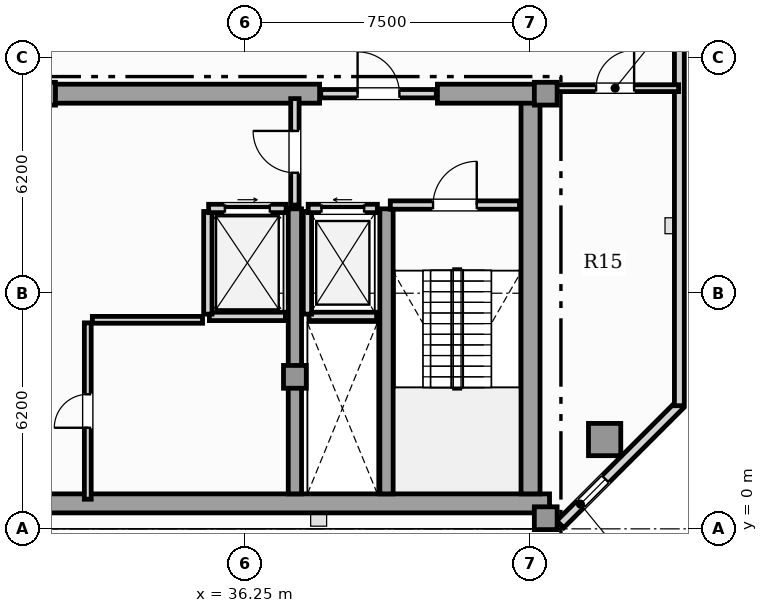
"""IFC4 building model, lengths in metres.
Left out: names, types, materials, properties, quantities, classifications, styles, units other than length and angle.
Written with IfcOpenShell. Run it as: python <this file> out.ifc"""

import sys

from ifc_helpers import new_model, si_unit, direction, frame, frame_2d, origin, origin_2d, place, context, subcontext, project, spatial, rectangle, hollow_rectangle, extrude, element, fill, save


model = new_model("IFC4")
c1 = context("Model", 3, precision=1e-05, world=origin(), true_north=direction((0.0, 1.0)))
c2 = subcontext(c1, "Body", "Model", "MODEL_VIEW")
j1 = project(units=[si_unit("LENGTHUNIT", "METRE"), si_unit("PLANEANGLEUNIT", "RADIAN")], contexts=[c1])
p1 = place(None, origin())
s1 = spatial("IfcSite", under=j1, at=p1, CompositionType="ELEMENT")
p2 = place(p1, origin())
s2 = spatial("IfcBuilding", under=s1, at=p2, CompositionType="ELEMENT")
p3 = place(p2, frame((0.0, 0.0, 357.85)))
s3 = spatial("IfcBuildingStorey", under=s2, at=p3, CompositionType="ELEMENT", Elevation=357.85)
p4 = place(p3, frame((13.25, 0.67, 0.0), z_axis=(0.0, 0.0, 1.0), x_axis=(1.0, 0.0, 0.0)))
e1 = element("IfcWall", 1, at=p4, inside=s3, PredefinedType="SHEAR", context=c2, shape_type="SweptSolid", body=[
    extrude(rectangle(XDim=31.0, YDim=0.5, at=frame_2d((15.5, 0.0))), origin(), (0.0, 0.0, 1.0), 4.14),
])
p5 = place(p3, frame((43.75, 0.92, 0.0), z_axis=(0.0, 0.0, 1.0), x_axis=(0.0, 1.0, 0.0)))
e2 = element("IfcWall", 2, at=p5, inside=s3, PredefinedType="SHEAR", context=c2, shape_type="SweptSolid", body=[
    extrude(rectangle(XDim=10.53, YDim=0.5, at=frame_2d((5.265, 0.0))), origin(), (0.0, 0.0, 1.0), 4.14),
])
p6 = place(p3, frame((30.9, 11.45, 0.0), z_axis=(0.0, 0.0, 1.0), x_axis=(1.0, 0.0, 0.0)))
e3 = element("IfcWall", 3, at=p6, inside=s3, PredefinedType="SHEAR", context=c2, shape_type="SweptSolid", body=[
    extrude(rectangle(XDim=7.3, YDim=0.5, at=frame_2d((3.65, 0.0))), origin(), (0.0, 0.0, 1.0), 4.14),
])
p7 = place(p3, frame((41.3, 11.45, 0.0), z_axis=(0.0, 0.0, 1.0), x_axis=(1.0, 0.0, 0.0)))
e4 = element("IfcWall", 4, at=p7, inside=s3, PredefinedType="SHEAR", context=c2, shape_type="SweptSolid", body=[
    extrude(rectangle(XDim=2.95, YDim=0.5, at=frame_2d((1.475, 0.0))), origin(), (0.0, 0.0, 1.0), 4.14),
])
for number, where, z_axis, x_axis in (
    (5, (37.55, 0.92, 0.0), (0.0, 0.0, 1.0), (0.0, 1.0, 0.0)),
    (6, (39.96, 0.92, 0.0), (0.0, 0.0, 1.0), (0.0, 1.0, 0.0)),
):
    element("IfcWall", number, at=place(p3, frame(where, z_axis=z_axis, x_axis=x_axis)), inside=s3, PredefinedType="SHEAR", context=c2, shape_type="SweptSolid", body=[
        extrude(rectangle(XDim=7.5, YDim=0.35, at=frame_2d((3.75, 0.0))), origin(), (0.0, 0.0, 1.0), 4.14),
    ])
for number, where, z_axis, x_axis in (
    (7, (44.15, 0.28, 0.0), (0.0, 0.0, 1.0), (1.0, 0.0, 0.0)),
    (8, (44.15, 11.45, 0.0), (0.0, 0.0, 1.0), (1.0, 0.0, 0.0)),
    (9, (37.55, 4.0, 0.0), (0.0, 0.0, 1.0), (1.0, 0.0, 0.0)),
    (10, (30.95, 11.45, 0.0), (0.0, 0.0, 1.0), (1.0, 0.0, 0.0)),
):
    element("IfcColumn", number, at=place(p3, frame(where, z_axis=z_axis, x_axis=x_axis)), inside=s3, PredefinedType="COLUMN", context=c2, shape_type="SweptSolid", body=[
        extrude(rectangle(XDim=0.6, YDim=0.6, at=origin_2d()), origin(), (0.0, 0.0, 1.0), 4.4),
    ])
p8 = place(p3, frame((45.7, 2.35, 0.0), z_axis=(0.0, 0.0, 1.0), x_axis=(1.0, 0.0, 0.0)))
e11 = element("IfcColumn", 11, at=p8, inside=s3, PredefinedType="USERDEFINED", context=c2, shape_type="SweptSolid", body=[
    extrude(hollow_rectangle(XDim=0.85, YDim=0.85, WallThickness=0.05, at=origin_2d()), origin(), (0.0, 0.0, 1.0), 4.4),
])
p9 = place(p3, frame((44.532, 0.12, 0.0), z_axis=(0.0, 0.0, 1.0), x_axis=(0.707079321262, 0.707134240044, 0.0)))
e12 = element("IfcWall", 12, at=p9, inside=s3, PredefinedType="SOLIDWALL", context=c2, shape_type="SweptSolid", body=[
    extrude(rectangle(XDim=4.446, YDim=0.26, at=frame_2d((2.223, 0.0))), origin(), (0.0, 0.0, 1.0), 4.14),
])
p10 = place(p9, frame((0.78, 0.0, 0.95)))
e13 = element("IfcOpeningElement", 13, at=p10, cuts=e12, PredefinedType="OPENING", context=c2, shape_type="SweptSolid", body=[
    extrude(rectangle(XDim=0.9, YDim=1.5, at=frame_2d((0.45, 0.75))), frame((0.0, 0.14, 0.0), z_axis=(0.0, -1.0, 0.0), x_axis=(1.0, 0.0, 0.0)), (0.0, 0.0, 1.0), 0.28),
])
p11 = place(p3, frame((47.666, 3.24, 0.0), z_axis=(0.0, 0.0, 1.0), x_axis=(0.0, 1.0, 0.0)))
e14 = element("IfcWall", 14, at=p11, inside=s3, PredefinedType="SOLIDWALL", context=c2, shape_type="SweptSolid", body=[
    extrude(rectangle(XDim=24.346, YDim=0.26, at=frame_2d((12.173, 0.0))), origin(), (0.0, 0.0, 1.0), 4.14),
])
p12 = place(p11, frame((20.615, 0.0, 0.95)))
e15 = element("IfcOpeningElement", 15, at=p12, cuts=e14, PredefinedType="OPENING", context=c2, shape_type="SweptSolid", body=[
    extrude(rectangle(XDim=0.9, YDim=1.5, at=frame_2d((0.45, 0.75))), frame((0.0, 0.14, 0.0), z_axis=(0.0, -1.0, 0.0), x_axis=(1.0, 0.0, 0.0)), (0.0, 0.0, 1.0), 0.28),
])
p13 = place(p11, frame((12.61, 0.0, 0.9)))
e16 = element("IfcOpeningElement", 16, at=p13, cuts=e14, PredefinedType="OPENING", context=c2, shape_type="SweptSolid", body=[
    extrude(rectangle(XDim=1.5, YDim=1.95, at=frame_2d((0.75, 0.975))), frame((0.0, 0.14, 0.0), z_axis=(0.0, -1.0, 0.0), x_axis=(1.0, 0.0, 0.0)), (0.0, 0.0, 1.0), 0.28),
])
p14 = place(p11, frame((22.076, 0.0, 0.9)))
e17 = element("IfcOpeningElement", 17, at=p14, cuts=e14, PredefinedType="OPENING", context=c2, shape_type="SweptSolid", body=[
    extrude(rectangle(XDim=1.5, YDim=1.95, at=frame_2d((0.75, 0.975))), frame((0.0, 0.14, 0.0), z_axis=(0.0, -1.0, 0.0), x_axis=(1.0, 0.0, 0.0)), (0.0, 0.0, 1.0), 0.28),
])
p15 = place(p3, frame((37.92, 5.59, 0.0), z_axis=(0.0, 0.0, 1.0), x_axis=(1.0, 0.0, 0.0)))
e18 = element("IfcWall", 18, at=p15, inside=s3, PredefinedType="SOLIDWALL", context=c2, shape_type="SweptSolid", body=[
    extrude(rectangle(XDim=1.78, YDim=0.22, at=frame_2d((0.89, 0.0))), origin(), (0.0, 0.0, 1.0), 4.14),
])
p16 = place(p3, frame((37.88, 5.65, 0.0), z_axis=(0.0, 0.0, 1.0), x_axis=(0.0, 1.0, 0.0)))
e19 = element("IfcWall", 19, at=p16, inside=s3, PredefinedType="SOLIDWALL", context=c2, shape_type="SweptSolid", body=[
    extrude(rectangle(XDim=2.7, YDim=0.22, at=frame_2d((1.35, 0.0))), origin(), (0.0, 0.0, 1.0), 4.14),
])
p17 = place(p3, frame((37.9, 8.43, 0.0), z_axis=(0.0, 0.0, 1.0), x_axis=(1.0, 0.0, 0.0)))
e20 = element("IfcWall", 20, at=p17, inside=s3, PredefinedType="SOLIDWALL", context=c2, shape_type="SweptSolid", body=[
    extrude(rectangle(XDim=1.82, YDim=0.22, at=frame_2d((0.91, 0.0))), origin(), (0.0, 0.0, 1.0), 4.14),
])
p18 = place(p17, frame((0.35, 0.0, 0.0)))
e21 = element("IfcOpeningElement", 21, at=p18, cuts=e20, PredefinedType="OPENING", context=c2, shape_type="SweptSolid", body=[
    extrude(rectangle(XDim=1.12, YDim=2.25, at=frame_2d((0.56, 1.125))), frame((0.0, 0.12, 0.0), z_axis=(0.0, -1.0, 0.0), x_axis=(1.0, 0.0, 0.0)), (0.0, 0.0, 1.0), 0.24),
])
p19 = place(p3, frame((35.3, 5.59, 0.0), z_axis=(0.0, 0.0, 1.0), x_axis=(1.0, 0.0, 0.0)))
e22 = element("IfcWall", 22, at=p19, inside=s3, PredefinedType="SOLIDWALL", context=c2, shape_type="SweptSolid", body=[
    extrude(rectangle(XDim=2.0, YDim=0.22, at=frame_2d((1.0, 0.0))), origin(), (0.0, 0.0, 1.0), 4.14),
])
p20 = place(p3, frame((35.26, 5.65, 0.0), z_axis=(0.0, 0.0, 1.0), x_axis=(0.0, 1.0, 0.0)))
e23 = element("IfcWall", 23, at=p20, inside=s3, PredefinedType="SOLIDWALL", context=c2, shape_type="SweptSolid", body=[
    extrude(rectangle(XDim=2.7, YDim=0.22, at=frame_2d((1.35, 0.0))), origin(), (0.0, 0.0, 1.0), 4.14),
])
p21 = place(p3, frame((35.28, 8.43, 0.0), z_axis=(0.0, 0.0, 1.0), x_axis=(1.0, 0.0, 0.0)))
e24 = element("IfcWall", 24, at=p21, inside=s3, PredefinedType="SOLIDWALL", context=c2, shape_type="SweptSolid", body=[
    extrude(rectangle(XDim=2.04, YDim=0.22, at=frame_2d((1.02, 0.0))), origin(), (0.0, 0.0, 1.0), 4.14),
])
p22 = place(p21, frame((0.43, 0.0, 0.0)))
e25 = element("IfcOpeningElement", 25, at=p22, cuts=e24, PredefinedType="OPENING", context=c2, shape_type="SweptSolid", body=[
    extrude(rectangle(XDim=1.18, YDim=2.2, at=frame_2d((0.59, 1.1))), frame((0.0, 0.12, 0.0), z_axis=(0.0, -1.0, 0.0), x_axis=(1.0, 0.0, 0.0)), (0.0, 0.0, 1.0), 0.24),
])
p23 = place(p3, frame((40.06, 8.52, 0.0), z_axis=(0.0, 0.0, 1.0), x_axis=(1.0, 0.0, 0.0)))
e26 = element("IfcWall", 26, at=p23, inside=s3, PredefinedType="SOLIDWALL", context=c2, shape_type="SweptSolid", body=[
    extrude(rectangle(XDim=3.4, YDim=0.22, at=frame_2d((1.7, 0.0))), origin(), (0.0, 0.0, 1.0), 4.14),
])
p24 = place(p23, frame((1.125, 0.0, 0.0)))
e27 = element("IfcOpeningElement", 27, at=p24, cuts=e26, PredefinedType="OPENING", context=c2, shape_type="SweptSolid", body=[
    extrude(rectangle(XDim=1.15, YDim=2.2, at=frame_2d((0.575, 1.1))), frame((0.0, 0.12, 0.0), z_axis=(0.0, -1.0, 0.0), x_axis=(1.0, 0.0, 0.0)), (0.0, 0.0, 1.0), 0.24),
])
p25 = place(p3, frame((37.55, 8.52, 0.0), z_axis=(0.0, 0.0, 1.0), x_axis=(0.0, 1.0, 0.0)))
e28 = element("IfcWall", 28, at=p25, inside=s3, PredefinedType="SOLIDWALL", context=c2, shape_type="SweptSolid", body=[
    extrude(rectangle(XDim=2.8, YDim=0.22, at=frame_2d((1.4, 0.0))), origin(), (0.0, 0.0, 1.0), 3.595),
])
p26 = place(p25, frame((0.85, 0.0, 0.0)))
e29 = element("IfcOpeningElement", 29, at=p26, cuts=e28, PredefinedType="OPENING", context=c2, shape_type="SweptSolid", body=[
    extrude(rectangle(XDim=1.1, YDim=2.2, at=frame_2d((0.55, 1.1))), frame((0.0, 0.12, 0.0), z_axis=(0.0, -1.0, 0.0), x_axis=(1.0, 0.0, 0.0)), (0.0, 0.0, 1.0), 0.24),
])
p27 = place(p3, frame((38.23, 11.45, 0.0), z_axis=(0.0, 0.0, 1.0), x_axis=(1.0, 0.0, 0.0)))
e30 = element("IfcWall", 30, at=p27, inside=s3, PredefinedType="SOLIDWALL", context=c2, shape_type="SweptSolid", body=[
    extrude(rectangle(XDim=3.04, YDim=0.22, at=frame_2d((1.52, 0.0))), origin(), (0.0, 0.0, 1.0), 4.14),
])
p28 = place(p27, frame((0.97, 0.0, 0.0)))
e31 = element("IfcOpeningElement", 31, at=p28, cuts=e30, PredefinedType="OPENING", context=c2, shape_type="SweptSolid", body=[
    extrude(rectangle(XDim=1.1, YDim=2.2, at=frame_2d((0.55, 1.1))), frame((0.0, 0.12, 0.0), z_axis=(0.0, -1.0, 0.0), x_axis=(1.0, 0.0, 0.0)), (0.0, 0.0, 1.0), 0.24),
])
p29 = place(p3, frame((32.1, 0.78, 0.0), z_axis=(0.0, 0.0, 1.0), x_axis=(0.0, 1.0, 0.0)))
e32 = element("IfcWall", 32, at=p29, inside=s3, PredefinedType="PARTITIONING", context=c2, shape_type="SweptSolid", body=[
    extrude(rectangle(XDim=4.64, YDim=0.18, at=frame_2d((2.32, 0.0))), origin(), (0.0, 0.0, 1.0), 4.14),
])
p30 = place(p29, frame((1.88, 0.0, 0.0)))
e33 = element("IfcOpeningElement", 33, at=p30, cuts=e32, PredefinedType="OPENING", context=c2, shape_type="SweptSolid", body=[
    extrude(rectangle(XDim=0.88, YDim=2.05, at=frame_2d((0.44, 1.025))), frame((0.0, 0.1, 0.0), z_axis=(0.0, -1.0, 0.0), x_axis=(1.0, 0.0, 0.0)), (0.0, 0.0, 1.0), 0.2),
])
p31 = place(p3, frame((32.22, 5.5, 0.0), z_axis=(0.0, 0.0, 1.0), x_axis=(1.0, 0.0, 0.0)))
e34 = element("IfcWall", 34, at=p31, inside=s3, PredefinedType="PARTITIONING", context=c2, shape_type="SweptSolid", body=[
    extrude(rectangle(XDim=2.9, YDim=0.18, at=frame_2d((1.45, 0.0))), origin(), (0.0, 0.0, 1.0), 4.14),
])
p32 = place(p3, frame((44.305, 11.595, 0.0), z_axis=(0.0, 0.0, 1.0), x_axis=(1.0, 0.0, 0.0)))
e35 = element("IfcWall", 35, at=p32, inside=s3, PredefinedType="PARTITIONING", context=c2, shape_type="SweptSolid", body=[
    extrude(rectangle(XDim=3.342, YDim=0.18, at=frame_2d((1.671, 0.0))), origin(), (0.0, 0.0, 1.0), 4.14),
])
p33 = place(p32, frame((1.171, 0.0, 0.0)))
e36 = element("IfcOpeningElement", 36, at=p33, cuts=e35, PredefinedType="OPENING", context=c2, shape_type="SweptSolid", body=[
    extrude(rectangle(XDim=1.0, YDim=2.15, at=frame_2d((0.5, 1.075))), frame((0.0, 0.1, 0.0), z_axis=(0.0, -1.0, 0.0), x_axis=(1.0, 0.0, 0.0)), (0.0, 0.0, 1.0), 0.2),
])
p34 = place(p10, origin())
e37 = element("IfcWindow", 37, at=p34, inside=s3, PartitioningType="SINGLE_PANEL", PredefinedType="WINDOW", context=c2, shape_type="SweptSolid", body=[
    extrude(rectangle(XDim=0.9, YDim=1.5, at=frame_2d((0.45, 0.75))), frame((0.0, 0.03, 0.0), z_axis=(0.0, -1.0, 0.0), x_axis=(1.0, 0.0, 0.0)), (0.0, 0.0, 1.0), 0.06),
])
fill(e13, e37)
p35 = place(p18, origin())
e38 = element("IfcDoor", 38, at=p35, inside=s3, OperationType="SLIDING_TO_LEFT", PredefinedType="DOOR", context=c2, shape_type="SweptSolid", body=[
    extrude(rectangle(XDim=1.12, YDim=2.25, at=frame_2d((0.56, 1.125))), frame((0.0, 0.025, 0.0), z_axis=(0.0, -1.0, 0.0), x_axis=(1.0, 0.0, 0.0)), (0.0, 0.0, 1.0), 0.05),
])
fill(e21, e38)
p36 = place(p22, origin())
e39 = element("IfcDoor", 39, at=p36, inside=s3, OperationType="SLIDING_TO_RIGHT", PredefinedType="DOOR", context=c2, shape_type="SweptSolid", body=[
    extrude(rectangle(XDim=1.18, YDim=2.2, at=frame_2d((0.59, 1.1))), frame((0.0, 0.025, 0.0), z_axis=(0.0, -1.0, 0.0), x_axis=(1.0, 0.0, 0.0)), (0.0, 0.0, 1.0), 0.05),
])
fill(e25, e39)
p37 = place(p24, origin())
e40 = element("IfcDoor", 40, at=p37, inside=s3, OperationType="SINGLE_SWING_RIGHT", PredefinedType="DOOR", context=c2, shape_type="SweptSolid", body=[
    extrude(rectangle(XDim=1.15, YDim=2.2, at=frame_2d((0.575, 1.1))), frame((0.0, 0.025, 0.0), z_axis=(0.0, -1.0, 0.0), x_axis=(1.0, 0.0, 0.0)), (0.0, 0.0, 1.0), 0.05),
])
fill(e27, e40)
p38 = place(p26, origin())
e41 = element("IfcDoor", 41, at=p38, inside=s3, OperationType="SINGLE_SWING_RIGHT", PredefinedType="DOOR", context=c2, shape_type="SweptSolid", body=[
    extrude(rectangle(XDim=1.1, YDim=2.2, at=frame_2d((0.55, 1.1))), frame((0.0, 0.025, 0.0), z_axis=(0.0, -1.0, 0.0), x_axis=(1.0, 0.0, 0.0)), (0.0, 0.0, 1.0), 0.05),
])
fill(e29, e41)
p39 = place(p28, origin())
e42 = element("IfcDoor", 42, at=p39, inside=s3, OperationType="SINGLE_SWING_LEFT", PredefinedType="DOOR", context=c2, shape_type="SweptSolid", body=[
    extrude(rectangle(XDim=1.1, YDim=2.2, at=frame_2d((0.55, 1.1))), frame((0.0, 0.025, 0.0), z_axis=(0.0, -1.0, 0.0), x_axis=(1.0, 0.0, 0.0)), (0.0, 0.0, 1.0), 0.05),
])
fill(e31, e42)
p40 = place(p30, origin())
e43 = element("IfcDoor", 43, at=p40, inside=s3, OperationType="SINGLE_SWING_LEFT", PredefinedType="DOOR", context=c2, shape_type="SweptSolid", body=[
    extrude(rectangle(XDim=0.88, YDim=2.05, at=frame_2d((0.44, 1.025))), frame((0.0, 0.025, 0.0), z_axis=(0.0, -1.0, 0.0), x_axis=(1.0, 0.0, 0.0)), (0.0, 0.0, 1.0), 0.05),
])
fill(e33, e43)
p41 = place(p33, origin())
e44 = element("IfcDoor", 44, at=p41, inside=s3, OperationType="SINGLE_SWING_RIGHT", PredefinedType="DOOR", context=c2, shape_type="SweptSolid", body=[
    extrude(rectangle(XDim=1.0, YDim=2.15, at=frame_2d((0.5, 1.075))), frame((0.0, 0.025, 0.0), z_axis=(0.0, -1.0, 0.0), x_axis=(1.0, 0.0, 0.0)), (0.0, 0.0, 1.0), 0.05),
])
fill(e36, e44)
save(model, sys.argv[1])
